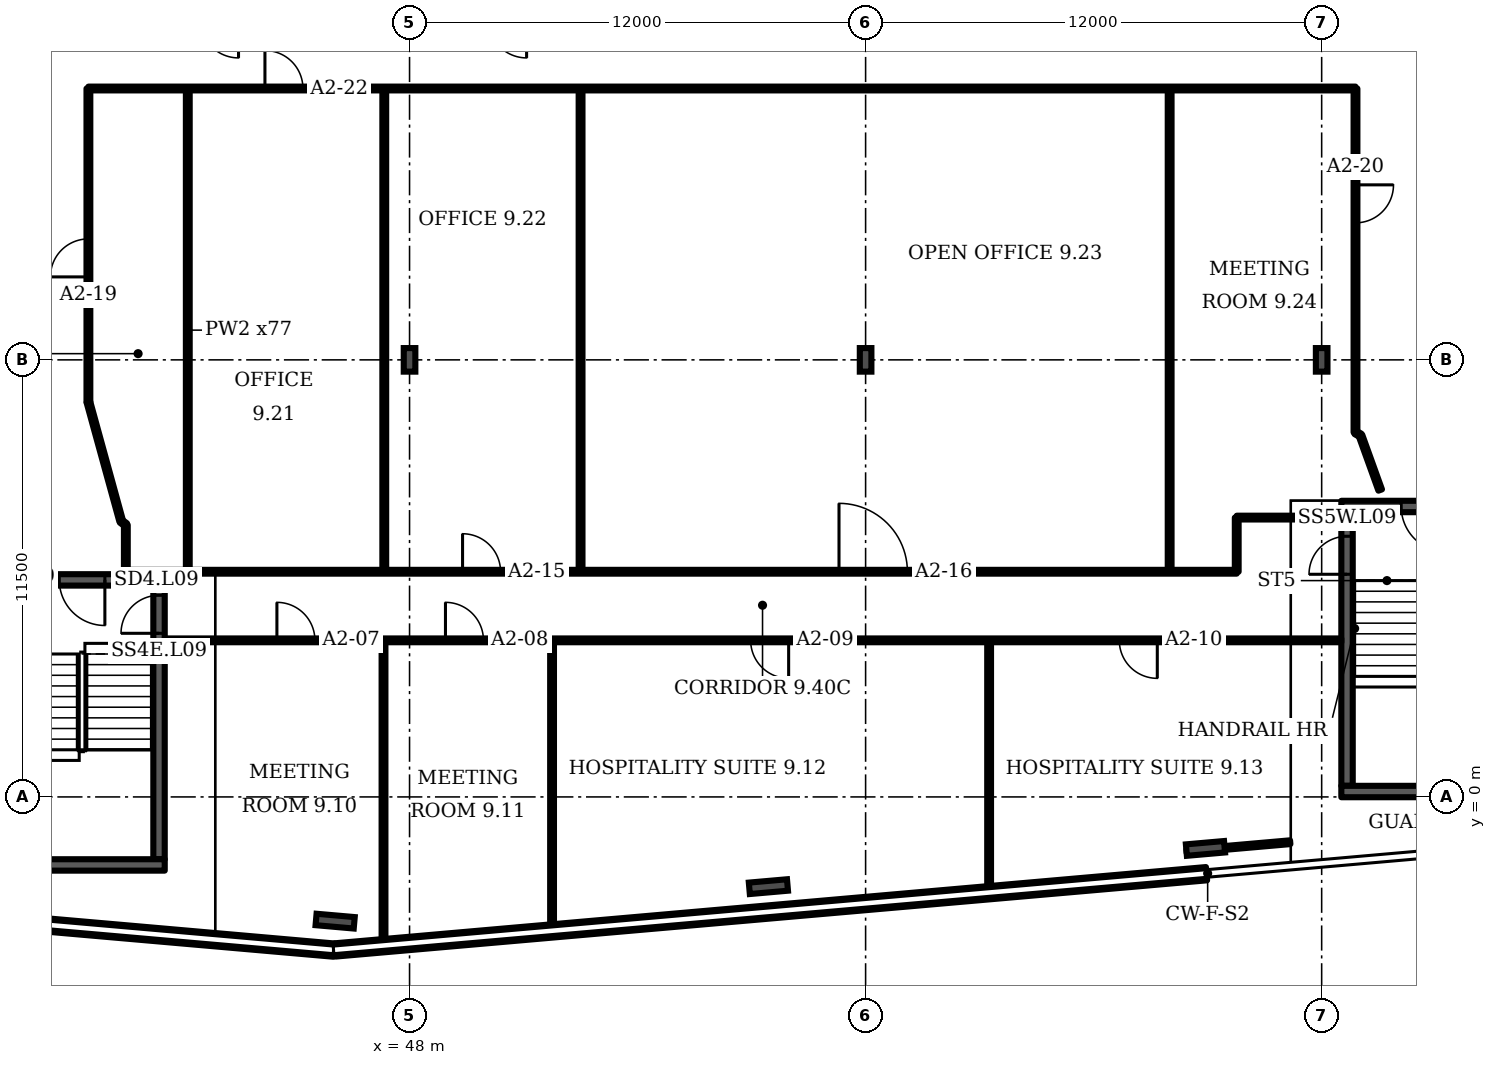
"""IFC4 building model, lengths in metres.
Left out: names, types, materials, properties, quantities, classifications, styles, units other than length and angle.
Written with IfcOpenShell. Run it as: python <this file> out.ifc"""

import sys

from ifc_helpers import new_model, si_unit, direction, frame, frame_2d, origin, origin_2d, place, context, subcontext, project, spatial, rectangle, i_section, extrude, element, fill, save


model = new_model("IFC4")
c1 = context("Model", 3, precision=1e-05, world=origin(), true_north=direction((0.0, 1.0)))
c2 = subcontext(c1, "Body", "Model", "MODEL_VIEW")
j1 = project(units=[si_unit("LENGTHUNIT", "METRE"), si_unit("PLANEANGLEUNIT", "RADIAN")], contexts=[c1])
p1 = place(None, origin())
s1 = spatial("IfcSite", under=j1, at=p1, CompositionType="ELEMENT")
p2 = place(p1, origin())
s2 = spatial("IfcBuilding", under=s1, at=p2, CompositionType="ELEMENT")
p3 = place(p2, frame((0.0, 0.0, 52.3)))
s3 = spatial("IfcBuildingStorey", under=s2, at=p3, CompositionType="ELEMENT", Elevation=52.3)
for number, where, z_axis, x_axis in (
    (1, (46.042, -3.268, 0.0), (0.0, 0.0, 1.0), (-0.087, -0.996, 0.0)),
    (2, (57.442, -2.361, 0.0), (0.0, 0.0, 1.0), (0.087, -0.996, 0.0)),
    (3, (68.942, -1.355, 0.0), (0.0, 0.0, 1.0), (0.087, -0.996, 0.0)),
):
    element("IfcColumn", number, at=place(p3, frame(where, z_axis=z_axis, x_axis=x_axis)), inside=s3, PredefinedType="COLUMN", context=c2, shape_type="SweptSolid", body=[
        extrude(i_section(OverallWidth=0.302, OverallDepth=1.008, WebThickness=0.021, FlangeThickness=0.04, FilletRadius=0.03, at=origin_2d()), origin(), (0.0, 0.0, 1.0), 3.6),
    ])
for number, where, z_axis, x_axis in (
    (4, (48.0, 11.5, 0.0), (0.0, 0.0, 1.0), (1.0, 0.0, 0.0)),
    (5, (60.0, 11.5, 0.0), (0.0, 0.0, 1.0), (1.0, 0.0, 0.0)),
    (6, (72.0, 11.5, 0.0), (0.0, 0.0, 1.0), (1.0, 0.0, 0.0)),
):
    element("IfcColumn", number, at=place(p3, frame(where, z_axis=z_axis, x_axis=x_axis)), inside=s3, PredefinedType="COLUMN", context=c2, shape_type="SweptSolid", body=[
        extrude(i_section(OverallWidth=0.305, OverallDepth=0.62, WebThickness=0.021, FlangeThickness=0.04, FilletRadius=0.027, at=origin_2d()), origin(), (0.0, 0.0, 1.0), 3.6),
    ])
p4 = place(p3, frame((34.601, -3.032, 0.0), z_axis=(0.0, 0.0, 1.0), x_axis=(0.996193, -0.087148, 0.0)))
e7 = element("IfcWall", 7, at=p4, inside=s3, PredefinedType="SOLIDWALL", context=c2, shape_type="SweptSolid", body=[
    extrude(rectangle(XDim=11.458, YDim=0.35, at=frame_2d((5.729, 0.0))), origin(), (0.0, 0.0, 1.0), 1.0),
])
p5 = place(p3, frame((46.045, -4.026, 0.0), z_axis=(0.0, 0.0, 1.0), x_axis=(0.99619, 0.087163, 0.0)))
e8 = element("IfcWall", 8, at=p5, inside=s3, PredefinedType="SOLIDWALL", context=c2, shape_type="SweptSolid", body=[
    extrude(rectangle(XDim=23.013, YDim=0.35, at=frame_2d((11.506, 0.0))), origin(), (0.0, 0.0, 1.0), 1.0),
])
p6 = place(p3, frame((37.208, 5.711, 0.0), z_axis=(0.0, 0.0, 1.0), x_axis=(1.0, 0.0, 0.0)))
e9 = element("IfcWall", 9, at=p6, inside=s3, PredefinedType="SHEAR", context=c2, shape_type="SweptSolid", body=[
    extrude(rectangle(XDim=4.35, YDim=0.3, at=frame_2d((2.175, 0.0))), origin(), (0.0, 0.0, 1.0), 3.2),
])
p7 = place(p6, frame((1.575, 0.0, 0.0)))
e10 = element("IfcOpeningElement", 10, at=p7, cuts=e9, PredefinedType="OPENING", context=c2, shape_type="SweptSolid", body=[
    extrude(rectangle(XDim=1.2, YDim=2.1, at=frame_2d((0.6, 1.05))), frame((0.0, 0.16, 0.0), z_axis=(0.0, -1.0, 0.0), x_axis=(1.0, 0.0, 0.0)), (0.0, 0.0, 1.0), 0.32),
])
p8 = place(p3, frame((41.408, -1.639, 0.0), z_axis=(0.0, 0.0, 1.0), x_axis=(0.0, 1.0, 0.0)))
e11 = element("IfcWall", 11, at=p8, inside=s3, PredefinedType="SHEAR", context=c2, shape_type="SweptSolid", body=[
    extrude(rectangle(XDim=7.2, YDim=0.3, at=frame_2d((3.6, 0.0))), origin(), (0.0, 0.0, 1.0), 3.2),
])
p9 = place(p8, frame((5.945, 0.0, 0.0)))
e12 = element("IfcOpeningElement", 12, at=p9, cuts=e11, PredefinedType="OPENING", context=c2, shape_type="SweptSolid", body=[
    extrude(rectangle(XDim=1.0, YDim=2.1, at=frame_2d((0.5, 1.05))), frame((0.0, 0.16, 0.0), z_axis=(0.0, -1.0, 0.0), x_axis=(1.0, 0.0, 0.0)), (0.0, 0.0, 1.0), 0.32),
])
p10 = place(p3, frame((72.518, 7.642, 0.0), z_axis=(0.0, 0.0, 1.0), x_axis=(1.0, 0.0, 0.0)))
e13 = element("IfcWall", 13, at=p10, inside=s3, PredefinedType="SHEAR", context=c2, shape_type="SweptSolid", body=[
    extrude(rectangle(XDim=4.35, YDim=0.3, at=frame_2d((2.175, 0.0))), origin(), (0.0, 0.0, 1.0), 3.2),
])
p11 = place(p10, frame((1.575, 0.0, 0.0)))
e14 = element("IfcOpeningElement", 14, at=p11, cuts=e13, PredefinedType="OPENING", context=c2, shape_type="SweptSolid", body=[
    extrude(rectangle(XDim=1.2, YDim=2.1, at=frame_2d((0.6, 1.05))), frame((0.0, 0.16, 0.0), z_axis=(0.0, -1.0, 0.0), x_axis=(1.0, 0.0, 0.0)), (0.0, 0.0, 1.0), 0.32),
])
p12 = place(p3, frame((72.667, 0.292, 0.0), z_axis=(0.0, 0.0, 1.0), x_axis=(0.0, 1.0, 0.0)))
e15 = element("IfcWall", 15, at=p12, inside=s3, PredefinedType="SHEAR", context=c2, shape_type="SweptSolid", body=[
    extrude(rectangle(XDim=7.2, YDim=0.3, at=frame_2d((3.6, 0.0))), origin(), (0.0, 0.0, 1.0), 3.2),
])
p13 = place(p12, frame((5.566, 0.0, 0.0)))
e16 = element("IfcOpeningElement", 16, at=p13, cuts=e15, PredefinedType="OPENING", context=c2, shape_type="SweptSolid", body=[
    extrude(rectangle(XDim=1.0, YDim=2.1, at=frame_2d((0.5, 1.05))), frame((0.0, 0.16, 0.0), z_axis=(0.0, -1.0, 0.0), x_axis=(1.0, 0.0, 0.0)), (0.0, 0.0, 1.0), 0.32),
])
p14 = place(p3, frame((39.55, 10.39, 0.0), z_axis=(0.0, 0.0, 1.0), x_axis=(0.0, 1.0, 0.0)))
e17 = element("IfcWall", 17, at=p14, inside=s3, PredefinedType="PARTITIONING", context=c2, shape_type="SweptSolid", body=[
    extrude(rectangle(XDim=8.25, YDim=0.1, at=frame_2d((4.125, 0.0))), origin(), (0.0, 0.0, 1.0), 3.2),
])
p15 = place(p14, frame((3.293, 0.0, 0.0)))
e18 = element("IfcOpeningElement", 18, at=p15, cuts=e17, PredefinedType="OPENING", context=c2, shape_type="SweptSolid", body=[
    extrude(rectangle(XDim=1.0, YDim=2.1, at=frame_2d((0.5, 1.05))), frame((0.0, 0.06, 0.0), z_axis=(0.0, -1.0, 0.0), x_axis=(1.0, 0.0, 0.0)), (0.0, 0.0, 1.0), 0.12),
])
p16 = place(p3, frame((39.55, 18.64, 0.0), z_axis=(0.0, 0.0, 1.0), x_axis=(1.0, 0.0, 0.0)))
e19 = element("IfcWall", 19, at=p16, inside=s3, PredefinedType="PARTITIONING", context=c2, shape_type="SweptSolid", body=[
    extrude(rectangle(XDim=33.34, YDim=0.1, at=frame_2d((16.67, 0.0))), origin(), (0.0, 0.0, 1.0), 3.2),
])
p17 = place(p16, frame((4.645, 0.0, 0.0)))
e20 = element("IfcOpeningElement", 20, at=p17, cuts=e19, PredefinedType="OPENING", context=c2, shape_type="SweptSolid", body=[
    extrude(rectangle(XDim=1.0, YDim=2.1, at=frame_2d((0.5, 1.05))), frame((0.0, 0.06, 0.0), z_axis=(0.0, -1.0, 0.0), x_axis=(1.0, 0.0, 0.0)), (0.0, 0.0, 1.0), 0.12),
])
p18 = place(p3, frame((40.415, 7.25, 0.0), z_axis=(0.0, 0.0, 1.0), x_axis=(-0.26559, 0.964085, 0.0)))
e21 = element("IfcWall", 21, at=p18, inside=s3, PredefinedType="PARTITIONING", context=c2, shape_type="SweptSolid", body=[
    extrude(rectangle(XDim=3.257, YDim=0.1, at=frame_2d((1.628, 0.0))), origin(), (0.0, 0.0, 1.0), 3.2),
])
p19 = place(p3, frame((40.535, 5.925, 0.0), z_axis=(0.0, 0.0, 1.0), x_axis=(0.0, 1.0, 0.0)))
e22 = element("IfcWall", 22, at=p19, inside=s3, PredefinedType="PARTITIONING", context=c2, shape_type="SweptSolid", body=[
    extrude(rectangle(XDim=1.235, YDim=0.1, at=frame_2d((0.617, 0.0))), origin(), (0.0, 0.0, 1.0), 3.2),
])
p20 = place(p3, frame((40.535, 5.925, 0.0), z_axis=(0.0, 0.0, 1.0), x_axis=(1.0, 0.0, 0.0)))
e23 = element("IfcWall", 23, at=p20, inside=s3, PredefinedType="PARTITIONING", context=c2, shape_type="SweptSolid", body=[
    extrude(rectangle(XDim=29.23, YDim=0.1, at=frame_2d((14.615, 0.0))), origin(), (0.0, 0.0, 1.0), 3.2),
])
p21 = place(p20, frame((8.86, 0.0, 0.0)))
e24 = element("IfcOpeningElement", 24, at=p21, cuts=e23, PredefinedType="OPENING", context=c2, shape_type="SweptSolid", body=[
    extrude(rectangle(XDim=1.0, YDim=2.1, at=frame_2d((0.5, 1.05))), frame((0.0, 0.06, 0.0), z_axis=(0.0, -1.0, 0.0), x_axis=(1.0, 0.0, 0.0)), (0.0, 0.0, 1.0), 0.12),
])
p22 = place(p20, frame((18.765, 0.0, 0.0)))
e25 = element("IfcOpeningElement", 25, at=p22, cuts=e23, PredefinedType="OPENING", context=c2, shape_type="SweptSolid", body=[
    extrude(rectangle(XDim=1.8, YDim=2.1, at=frame_2d((0.9, 1.05))), frame((0.0, 0.06, 0.0), z_axis=(0.0, -1.0, 0.0), x_axis=(1.0, 0.0, 0.0)), (0.0, 0.0, 1.0), 0.12),
])
p23 = place(p3, frame((40.535, 7.16, 0.0), z_axis=(0.0, 0.0, 1.0), x_axis=(-0.799412, 0.60078, 0.0)))
e26 = element("IfcWall", 26, at=p23, inside=s3, PredefinedType="PARTITIONING", context=c2, shape_type="SweptSolid", body=[
    extrude(rectangle(XDim=0.15, YDim=0.1, at=frame_2d((0.075, 0.0))), origin(), (0.0, 0.0, 1.0), 3.2),
])
p24 = place(p3, frame((41.558, 4.12, 0.0), z_axis=(0.0, 0.0, 1.0), x_axis=(1.0, 0.0, 0.0)))
e27 = element("IfcWall", 27, at=p24, inside=s3, PredefinedType="PARTITIONING", context=c2, shape_type="SweptSolid", body=[
    extrude(rectangle(XDim=30.959, YDim=0.1, at=frame_2d((15.479, 0.0))), origin(), (0.0, 0.0, 1.0), 3.2),
])
p25 = place(p24, frame((2.952, 0.0, 0.0)))
e28 = element("IfcOpeningElement", 28, at=p25, cuts=e27, PredefinedType="OPENING", context=c2, shape_type="SweptSolid", body=[
    extrude(rectangle(XDim=1.0, YDim=2.1, at=frame_2d((0.5, 1.05))), frame((0.0, 0.06, 0.0), z_axis=(0.0, -1.0, 0.0), x_axis=(1.0, 0.0, 0.0)), (0.0, 0.0, 1.0), 0.12),
])
p26 = place(p24, frame((7.387, 0.0, 0.0)))
e29 = element("IfcOpeningElement", 29, at=p26, cuts=e27, PredefinedType="OPENING", context=c2, shape_type="SweptSolid", body=[
    extrude(rectangle(XDim=1.0, YDim=2.1, at=frame_2d((0.5, 1.05))), frame((0.0, 0.06, 0.0), z_axis=(0.0, -1.0, 0.0), x_axis=(1.0, 0.0, 0.0)), (0.0, 0.0, 1.0), 0.12),
])
p27 = place(p24, frame((15.417, 0.0, 0.0)))
e30 = element("IfcOpeningElement", 30, at=p27, cuts=e27, PredefinedType="OPENING", context=c2, shape_type="SweptSolid", body=[
    extrude(rectangle(XDim=1.0, YDim=2.1, at=frame_2d((0.5, 1.05))), frame((0.0, 0.06, 0.0), z_axis=(0.0, -1.0, 0.0), x_axis=(1.0, 0.0, 0.0)), (0.0, 0.0, 1.0), 0.12),
])
p28 = place(p24, frame((25.117, 0.0, 0.0)))
e31 = element("IfcOpeningElement", 31, at=p28, cuts=e27, PredefinedType="OPENING", context=c2, shape_type="SweptSolid", body=[
    extrude(rectangle(XDim=1.0, YDim=2.1, at=frame_2d((0.5, 1.05))), frame((0.0, 0.06, 0.0), z_axis=(0.0, -1.0, 0.0), x_axis=(1.0, 0.0, 0.0)), (0.0, 0.0, 1.0), 0.12),
])
p29 = place(p3, frame((42.165, 5.925, 0.0), z_axis=(0.0, 0.0, 1.0), x_axis=(0.0, 1.0, 0.0)))
e32 = element("IfcWall", 32, at=p29, inside=s3, PredefinedType="PARTITIONING", context=c2, shape_type="SweptSolid", body=[
    extrude(rectangle(XDim=12.715, YDim=0.1, at=frame_2d((6.357, 0.0))), origin(), (0.0, 0.0, 1.0), 3.2),
])
p30 = place(p3, frame((47.315, -3.889, 0.0), z_axis=(0.0, 0.0, 1.0), x_axis=(0.0, 1.0, 0.0)))
e33 = element("IfcWall", 33, at=p30, inside=s3, PredefinedType="PARTITIONING", context=c2, shape_type="SweptSolid", body=[
    extrude(rectangle(XDim=8.01, YDim=0.1, at=frame_2d((4.005, 0.0))), origin(), (0.0, 0.0, 1.0), 2.58),
])
p31 = place(p3, frame((47.335, 5.925, 0.0), z_axis=(0.0, 0.0, 1.0), x_axis=(0.0, 1.0, 0.0)))
e34 = element("IfcWall", 34, at=p31, inside=s3, PredefinedType="PARTITIONING", context=c2, shape_type="SweptSolid", body=[
    extrude(rectangle(XDim=12.715, YDim=0.1, at=frame_2d((6.357, 0.0))), origin(), (0.0, 0.0, 1.0), 3.2),
])
p32 = place(p3, frame((51.75, -3.501, 0.0), z_axis=(0.0, 0.0, 1.0), x_axis=(0.0, 1.0, 0.0)))
e35 = element("IfcWall", 35, at=p32, inside=s3, PredefinedType="PARTITIONING", context=c2, shape_type="SweptSolid", body=[
    extrude(rectangle(XDim=7.621, YDim=0.1, at=frame_2d((3.811, 0.0))), origin(), (0.0, 0.0, 1.0), 2.58),
])
p33 = place(p3, frame((52.5, 5.93, 0.0), z_axis=(0.0, 0.0, 1.0), x_axis=(0.0, 1.0, 0.0)))
e36 = element("IfcWall", 36, at=p33, inside=s3, PredefinedType="PARTITIONING", context=c2, shape_type="SweptSolid", body=[
    extrude(rectangle(XDim=12.71, YDim=0.1, at=frame_2d((6.355, 0.0))), origin(), (0.0, 0.0, 1.0), 3.2),
])
p34 = place(p3, frame((63.25, -2.495, 0.0), z_axis=(0.0, 0.0, 1.0), x_axis=(0.0, 1.0, 0.0)))
e37 = element("IfcWall", 37, at=p34, inside=s3, PredefinedType="PARTITIONING", context=c2, shape_type="SweptSolid", body=[
    extrude(rectangle(XDim=6.615, YDim=0.1, at=frame_2d((3.308, 0.0))), origin(), (0.0, 0.0, 1.0), 2.58),
])
p35 = place(p3, frame((68.0, 5.925, 0.0), z_axis=(0.0, 0.0, 1.0), x_axis=(0.0, 1.0, 0.0)))
e38 = element("IfcWall", 38, at=p35, inside=s3, PredefinedType="PARTITIONING", context=c2, shape_type="SweptSolid", body=[
    extrude(rectangle(XDim=12.715, YDim=0.1, at=frame_2d((6.357, 0.0))), origin(), (0.0, 0.0, 1.0), 3.2),
])
p36 = place(p3, frame((68.445, -1.43, 0.0), z_axis=(0.0, 0.0, 1.0), x_axis=(0.996195, 0.087118, 0.0)))
e39 = element("IfcWall", 39, at=p36, inside=s3, PredefinedType="PARTITIONING", context=c2, shape_type="SweptSolid", body=[
    extrude(rectangle(XDim=2.738, YDim=0.1, at=frame_2d((1.369, 0.0))), origin(), (0.0, 0.0, 1.0), 2.58),
])
p37 = place(p3, frame((69.765, 5.925, 0.0), z_axis=(0.0, 0.0, 1.0), x_axis=(0.0, 1.0, 0.0)))
e40 = element("IfcWall", 40, at=p37, inside=s3, PredefinedType="PARTITIONING", context=c2, shape_type="SweptSolid", body=[
    extrude(rectangle(XDim=1.425, YDim=0.1, at=frame_2d((0.712, 0.0))), origin(), (0.0, 0.0, 1.0), 3.2),
])
p38 = place(p3, frame((69.765, 7.35, 0.0), z_axis=(0.0, 0.0, 1.0), x_axis=(1.0, 0.0, 0.0)))
e41 = element("IfcWall", 41, at=p38, inside=s3, PredefinedType="PARTITIONING", context=c2, shape_type="SweptSolid", body=[
    extrude(rectangle(XDim=2.753, YDim=0.1, at=frame_2d((1.376, 0.0))), origin(), (0.0, 0.0, 1.0), 3.2),
])
p39 = place(p3, frame((72.89, 9.59, 0.0), z_axis=(0.0, 0.0, 1.0), x_axis=(0.0, 1.0, 0.0)))
e42 = element("IfcWall", 42, at=p39, inside=s3, PredefinedType="PARTITIONING", context=c2, shape_type="SweptSolid", body=[
    extrude(rectangle(XDim=9.05, YDim=0.1, at=frame_2d((4.525, 0.0))), origin(), (0.0, 0.0, 1.0), 3.2),
])
p40 = place(p39, frame((5.515, 0.0, 0.0)))
e43 = element("IfcOpeningElement", 43, at=p40, cuts=e42, PredefinedType="OPENING", context=c2, shape_type="SweptSolid", body=[
    extrude(rectangle(XDim=1.0, YDim=2.1, at=frame_2d((0.5, 1.05))), frame((0.0, 0.06, 0.0), z_axis=(0.0, -1.0, 0.0), x_axis=(1.0, 0.0, 0.0)), (0.0, 0.0, 1.0), 0.12),
])
p41 = place(p3, frame((73.02, 9.515, 0.0), z_axis=(0.0, 0.0, 1.0), x_axis=(-0.865836, 0.500333, 0.0)))
e44 = element("IfcWall", 44, at=p41, inside=s3, PredefinedType="PARTITIONING", context=c2, shape_type="SweptSolid", body=[
    extrude(rectangle(XDim=0.15, YDim=0.1, at=frame_2d((0.075, 0.0))), origin(), (0.0, 0.0, 1.0), 3.2),
])
p42 = place(p3, frame((73.54, 8.075, 0.0), z_axis=(0.0, 0.0, 1.0), x_axis=(-0.339669, 0.940548, 0.0)))
e45 = element("IfcWall", 45, at=p42, inside=s3, PredefinedType="PARTITIONING", context=c2, shape_type="SweptSolid", body=[
    extrude(rectangle(XDim=1.531, YDim=0.1, at=frame_2d((0.766, 0.0))), origin(), (0.0, 0.0, 1.0), 3.2),
])
p43 = place(p3, frame((72.817, 7.354, 0.0), z_axis=(0.0, 0.0, 1.0), x_axis=(0.999994, 0.002027, 0.0)))
e46 = element("IfcWall", 46, at=p43, inside=s3, PredefinedType="PARTITIONING", context=c2, shape_type="SweptSolid", body=[
    extrude(rectangle(XDim=0.723, YDim=0.1, at=frame_2d((0.361, 0.0))), origin(), (0.0, 0.0, 1.0), 3.2),
])
p44 = place(p3, frame((37.208, -1.789, 0.0), z_axis=(0.0, 0.0, 1.0), x_axis=(1.0, 0.0, 0.0)))
e47 = element("IfcWall", 47, at=p44, inside=s3, PredefinedType="SHEAR", context=c2, shape_type="SweptSolid", body=[
    extrude(rectangle(XDim=4.35, YDim=0.3, at=frame_2d((2.175, 0.0))), origin(), (0.0, 0.0, 1.0), 3.2),
])
p45 = place(p3, frame((72.518, 0.142, 0.0), z_axis=(0.0, 0.0, 1.0), x_axis=(1.0, 0.0, 0.0)))
e48 = element("IfcWall", 48, at=p45, inside=s3, PredefinedType="SHEAR", context=c2, shape_type="SweptSolid", body=[
    extrude(rectangle(XDim=4.05, YDim=0.3, at=frame_2d((2.025, 0.0))), origin(), (0.0, 0.0, 1.0), 3.2),
])
p46 = place(p9, origin())
e49 = element("IfcDoor", 49, at=p46, inside=s3, OperationType="SINGLE_SWING_LEFT", PredefinedType="DOOR", context=c2, shape_type="SweptSolid", body=[
    extrude(rectangle(XDim=1.0, YDim=2.1, at=frame_2d((0.5, 1.05))), frame((0.0, 0.025, 0.0), z_axis=(0.0, -1.0, 0.0), x_axis=(1.0, 0.0, 0.0)), (0.0, 0.0, 1.0), 0.05),
])
fill(e12, e49)
p47 = place(p7, origin())
e50 = element("IfcDoor", 50, at=p47, inside=s3, OperationType="SINGLE_SWING_RIGHT", PredefinedType="DOOR", context=c2, shape_type="SweptSolid", body=[
    extrude(rectangle(XDim=1.2, YDim=2.1, at=frame_2d((0.6, 1.05))), frame((0.0, 0.025, 0.0), z_axis=(0.0, -1.0, 0.0), x_axis=(1.0, 0.0, 0.0)), (0.0, 0.0, 1.0), 0.05),
])
fill(e10, e50)
p48 = place(p13, origin())
e51 = element("IfcDoor", 51, at=p48, inside=s3, OperationType="SINGLE_SWING_LEFT", PredefinedType="DOOR", context=c2, shape_type="SweptSolid", body=[
    extrude(rectangle(XDim=1.0, YDim=2.1, at=frame_2d((0.5, 1.05))), frame((0.0, 0.025, 0.0), z_axis=(0.0, -1.0, 0.0), x_axis=(1.0, 0.0, 0.0)), (0.0, 0.0, 1.0), 0.05),
])
fill(e16, e51)
p49 = place(p11, origin())
e52 = element("IfcDoor", 52, at=p49, inside=s3, OperationType="SINGLE_SWING_RIGHT", PredefinedType="DOOR", context=c2, shape_type="SweptSolid", body=[
    extrude(rectangle(XDim=1.2, YDim=2.1, at=frame_2d((0.6, 1.05))), frame((0.0, 0.025, 0.0), z_axis=(0.0, -1.0, 0.0), x_axis=(1.0, 0.0, 0.0)), (0.0, 0.0, 1.0), 0.05),
])
fill(e14, e52)
p50 = place(p25, origin())
e53 = element("IfcDoor", 53, at=p50, inside=s3, OperationType="SINGLE_SWING_LEFT", PredefinedType="DOOR", context=c2, shape_type="SweptSolid", body=[
    extrude(rectangle(XDim=1.0, YDim=2.1, at=frame_2d((0.5, 1.05))), frame((0.0, 0.025, 0.0), z_axis=(0.0, -1.0, 0.0), x_axis=(1.0, 0.0, 0.0)), (0.0, 0.0, 1.0), 0.05),
])
fill(e28, e53)
p51 = place(p26, origin())
e54 = element("IfcDoor", 54, at=p51, inside=s3, OperationType="SINGLE_SWING_LEFT", PredefinedType="DOOR", context=c2, shape_type="SweptSolid", body=[
    extrude(rectangle(XDim=1.0, YDim=2.1, at=frame_2d((0.5, 1.05))), frame((0.0, 0.025, 0.0), z_axis=(0.0, -1.0, 0.0), x_axis=(1.0, 0.0, 0.0)), (0.0, 0.0, 1.0), 0.05),
])
fill(e29, e54)
p52 = place(p27, origin())
e55 = element("IfcDoor", 55, at=p52, inside=s3, OperationType="SINGLE_SWING_RIGHT", PredefinedType="DOOR", context=c2, shape_type="SweptSolid", body=[
    extrude(rectangle(XDim=1.0, YDim=2.1, at=frame_2d((0.5, 1.05))), frame((0.0, 0.025, 0.0), z_axis=(0.0, -1.0, 0.0), x_axis=(1.0, 0.0, 0.0)), (0.0, 0.0, 1.0), 0.05),
])
fill(e30, e55)
p53 = place(p28, origin())
e56 = element("IfcDoor", 56, at=p53, inside=s3, OperationType="SINGLE_SWING_RIGHT", PredefinedType="DOOR", context=c2, shape_type="SweptSolid", body=[
    extrude(rectangle(XDim=1.0, YDim=2.1, at=frame_2d((0.5, 1.05))), frame((0.0, 0.025, 0.0), z_axis=(0.0, -1.0, 0.0), x_axis=(1.0, 0.0, 0.0)), (0.0, 0.0, 1.0), 0.05),
])
fill(e31, e56)
p54 = place(p21, origin())
e57 = element("IfcDoor", 57, at=p54, inside=s3, OperationType="SINGLE_SWING_LEFT", PredefinedType="DOOR", context=c2, shape_type="SweptSolid", body=[
    extrude(rectangle(XDim=1.0, YDim=2.1, at=frame_2d((0.5, 1.05))), frame((0.0, 0.025, 0.0), z_axis=(0.0, -1.0, 0.0), x_axis=(1.0, 0.0, 0.0)), (0.0, 0.0, 1.0), 0.05),
])
fill(e24, e57)
p55 = place(p22, origin())
e58 = element("IfcDoor", 58, at=p55, inside=s3, OperationType="DOUBLE_DOOR_SINGLE_SWING", PredefinedType="DOOR", context=c2, shape_type="SweptSolid", body=[
    extrude(rectangle(XDim=1.8, YDim=2.1, at=frame_2d((0.9, 1.05))), frame((0.0, 0.025, 0.0), z_axis=(0.0, -1.0, 0.0), x_axis=(1.0, 0.0, 0.0)), (0.0, 0.0, 1.0), 0.05),
])
fill(e25, e58)
p56 = place(p15, origin())
e59 = element("IfcDoor", 59, at=p56, inside=s3, OperationType="SINGLE_SWING_LEFT", PredefinedType="DOOR", context=c2, shape_type="SweptSolid", body=[
    extrude(rectangle(XDim=1.0, YDim=2.1, at=frame_2d((0.5, 1.05))), frame((0.0, 0.025, 0.0), z_axis=(0.0, -1.0, 0.0), x_axis=(1.0, 0.0, 0.0)), (0.0, 0.0, 1.0), 0.05),
])
fill(e18, e59)
p57 = place(p40, origin())
e60 = element("IfcDoor", 60, at=p57, inside=s3, OperationType="SINGLE_SWING_RIGHT", PredefinedType="DOOR", context=c2, shape_type="SweptSolid", body=[
    extrude(rectangle(XDim=1.0, YDim=2.1, at=frame_2d((0.5, 1.05))), frame((0.0, 0.025, 0.0), z_axis=(0.0, -1.0, 0.0), x_axis=(1.0, 0.0, 0.0)), (0.0, 0.0, 1.0), 0.05),
])
fill(e43, e60)
p58 = place(p17, origin())
e61 = element("IfcDoor", 61, at=p58, inside=s3, OperationType="SINGLE_SWING_LEFT", PredefinedType="DOOR", context=c2, shape_type="SweptSolid", body=[
    extrude(rectangle(XDim=1.0, YDim=2.1, at=frame_2d((0.5, 1.05))), frame((0.0, 0.025, 0.0), z_axis=(0.0, -1.0, 0.0), x_axis=(1.0, 0.0, 0.0)), (0.0, 0.0, 1.0), 0.05),
])
fill(e20, e61)
save(model, sys.argv[1])
